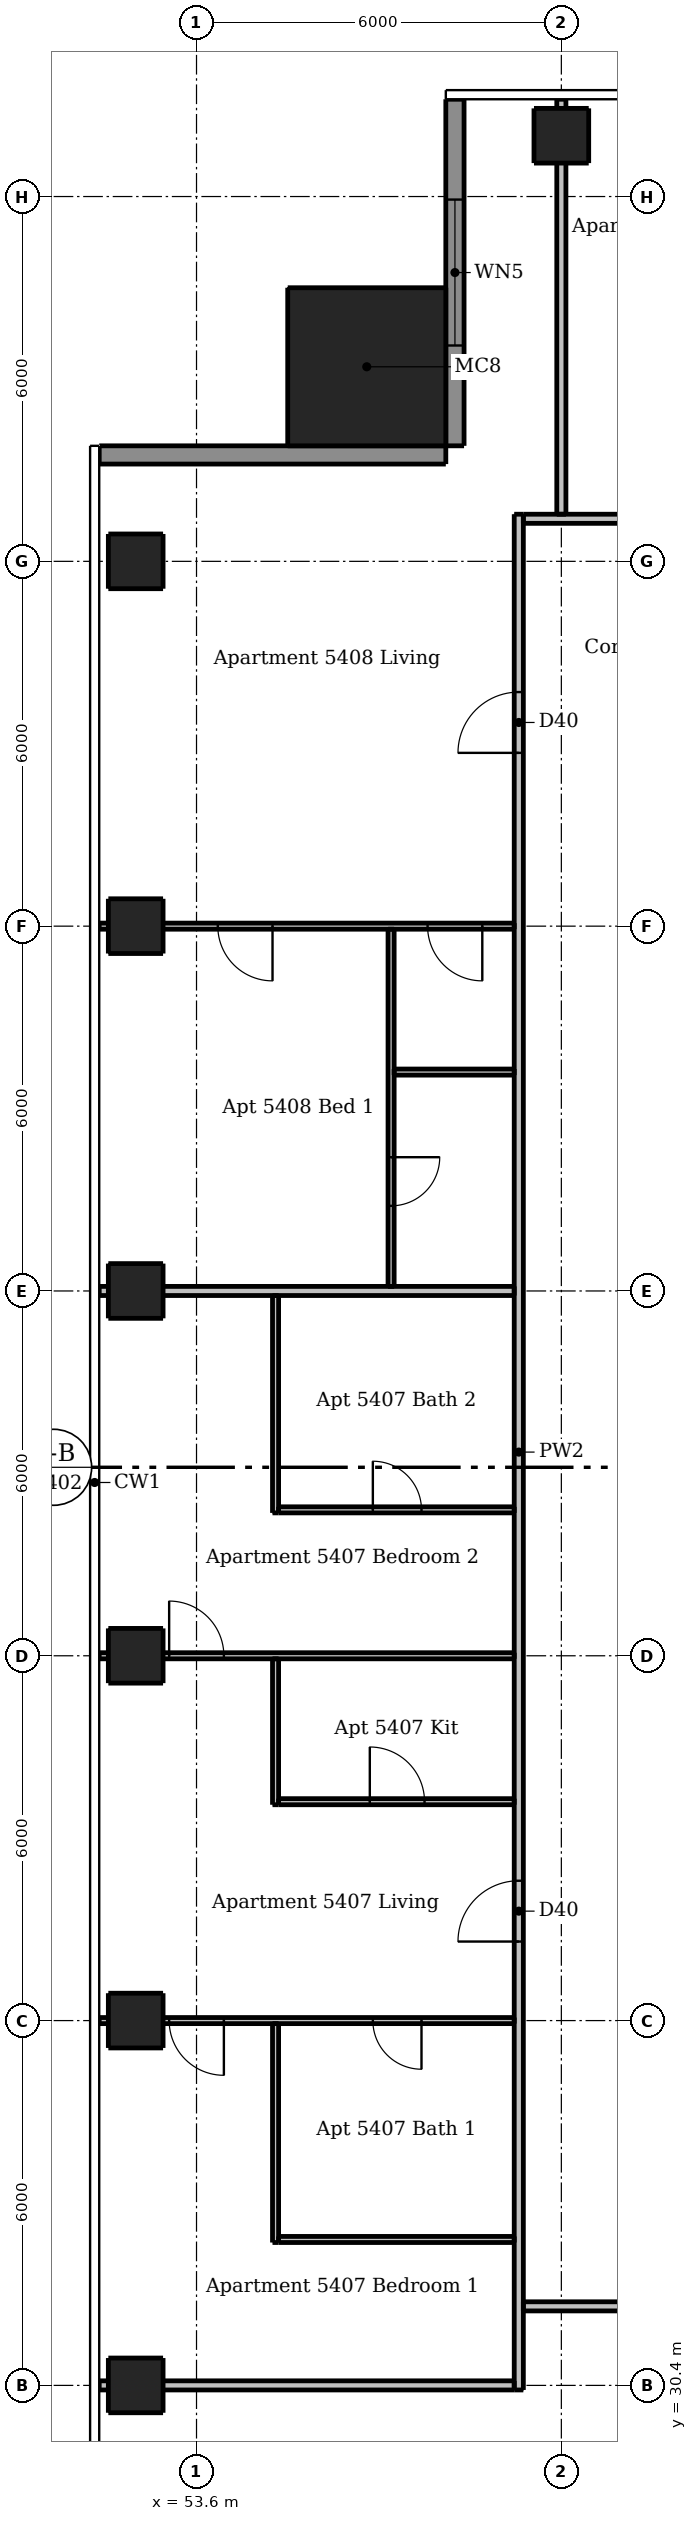
"""IFC4 building model, lengths in metres.
Left out: names, types, materials, properties, quantities, classifications, styles, units other than length and angle.
Written with IfcOpenShell. Run it as: python <this file> out.ifc"""

import sys

from ifc_helpers import new_model, si_unit, direction, frame, frame_2d, origin, origin_2d, place, context, subcontext, project, spatial, rectangle, extrude, element, fill, save


model = new_model("IFC4")
c1 = context("Model", 3, precision=1e-05, world=origin(), true_north=direction((0.0, 1.0)))
c2 = subcontext(c1, "Body", "Model", "MODEL_VIEW")
j1 = project(units=[si_unit("LENGTHUNIT", "METRE"), si_unit("PLANEANGLEUNIT", "RADIAN")], contexts=[c1])
p1 = place(None, origin())
s1 = spatial("IfcSite", under=j1, at=p1, CompositionType="ELEMENT")
p2 = place(p1, origin())
s2 = spatial("IfcBuilding", under=s1, at=p2, CompositionType="ELEMENT")
p3 = place(p2, frame((0.0, 0.0, 203.5)))
s3 = spatial("IfcBuildingStorey", under=s2, at=p3, CompositionType="ELEMENT", Elevation=203.5)
for number, where, z_axis, x_axis in (
    (1, (59.6, 67.4, 0.0), (0.0, 0.0, 1.0), (1.0, 0.0, 0.0)),
    (2, (52.6, 30.4, 0.0), (0.0, 0.0, 1.0), (1.0, 0.0, 0.0)),
    (3, (52.6, 36.4, 0.0), (0.0, 0.0, 1.0), (1.0, 0.0, 0.0)),
    (4, (52.6, 42.4, 0.0), (0.0, 0.0, 1.0), (1.0, 0.0, 0.0)),
    (5, (52.6, 48.4, 0.0), (0.0, 0.0, 1.0), (1.0, 0.0, 0.0)),
    (6, (52.6, 54.4, 0.0), (0.0, 0.0, 1.0), (1.0, 0.0, 0.0)),
    (7, (52.6, 60.4, 0.0), (0.0, 0.0, 1.0), (1.0, 0.0, 0.0)),
):
    element("IfcColumn", number, at=place(p3, frame(where, z_axis=z_axis, x_axis=x_axis)), inside=s3, PredefinedType="COLUMN", context=c2, shape_type="SweptSolid", body=[
        extrude(rectangle(XDim=0.9, YDim=0.9, at=origin_2d()), origin(), (0.0, 0.0, 1.0), 3.05),
    ])
p4 = place(p3, frame((56.4, 63.6, 0.0), z_axis=(0.0, 0.0, 1.0), x_axis=(1.0, 0.0, 0.0)))
e8 = element("IfcColumn", 8, at=p4, inside=s3, PredefinedType="COLUMN", context=c2, shape_type="SweptSolid", body=[
    extrude(rectangle(XDim=2.6, YDim=2.6, at=origin_2d()), origin(), (0.0, 0.0, 1.0), 3.3),
])
p5 = place(p3, frame((57.85, 68.0, 0.0), z_axis=(0.0, 0.0, 1.0), x_axis=(0.0, -1.0, 0.0)))
e9 = element("IfcWall", 9, at=p5, inside=s3, PredefinedType="SOLIDWALL", context=c2, shape_type="SweptSolid", body=[
    extrude(rectangle(XDim=5.7, YDim=0.3, at=frame_2d((2.85, 0.0))), origin(), (0.0, 0.0, 1.0), 3.05),
])
p6 = place(p5, frame((1.65, 0.0, 0.15)))
e10 = element("IfcOpeningElement", 10, at=p6, cuts=e9, PredefinedType="OPENING", context=c2, shape_type="SweptSolid", body=[
    extrude(rectangle(XDim=2.4, YDim=2.1, at=frame_2d((1.2, 1.05))), frame((0.0, 0.16, 0.0), z_axis=(0.0, -1.0, 0.0), x_axis=(1.0, 0.0, 0.0)), (0.0, 0.0, 1.0), 0.32),
])
p7 = place(p3, frame((57.7, 62.15, 0.0), z_axis=(0.0, 0.0, 1.0), x_axis=(-1.0, 0.0, 0.0)))
e11 = element("IfcWall", 11, at=p7, inside=s3, PredefinedType="SOLIDWALL", context=c2, shape_type="SweptSolid", body=[
    extrude(rectangle(XDim=5.7, YDim=0.3, at=frame_2d((2.85, 0.0))), origin(), (0.0, 0.0, 1.0), 3.05),
])
p8 = place(p3, frame((54.9, 32.75, 0.0), z_axis=(0.0, 0.0, 1.0), x_axis=(0.0, 1.0, 0.0)))
e12 = element("IfcWall", 12, at=p8, inside=s3, PredefinedType="PARTITIONING", context=c2, shape_type="SweptSolid", body=[
    extrude(rectangle(XDim=3.6, YDim=0.1, at=frame_2d((1.8, 0.0))), origin(), (0.0, 0.0, 1.0), 3.05),
])
p9 = place(p3, frame((54.9, 39.95, 0.0), z_axis=(0.0, 0.0, 1.0), x_axis=(0.0, 1.0, 0.0)))
e13 = element("IfcWall", 13, at=p9, inside=s3, PredefinedType="PARTITIONING", context=c2, shape_type="SweptSolid", body=[
    extrude(rectangle(XDim=2.4, YDim=0.1, at=frame_2d((1.2, 0.0))), origin(), (0.0, 0.0, 1.0), 3.05),
])
p10 = place(p3, frame((54.9, 44.75, 0.0), z_axis=(0.0, 0.0, 1.0), x_axis=(0.0, 1.0, 0.0)))
e14 = element("IfcWall", 14, at=p10, inside=s3, PredefinedType="PARTITIONING", context=c2, shape_type="SweptSolid", body=[
    extrude(rectangle(XDim=3.575, YDim=0.1, at=frame_2d((1.788, 0.0))), origin(), (0.0, 0.0, 1.0), 3.05),
])
p11 = place(p3, frame((56.8, 54.35, 0.0), z_axis=(0.0, 0.0, 1.0), x_axis=(0.0, -1.0, 0.0)))
e15 = element("IfcWall", 15, at=p11, inside=s3, PredefinedType="PARTITIONING", context=c2, shape_type="SweptSolid", body=[
    extrude(rectangle(XDim=5.875, YDim=0.1, at=frame_2d((2.938, 0.0))), origin(), (0.0, 0.0, 1.0), 3.05),
])
p12 = place(p11, frame((3.75, 0.0, 0.0)))
e16 = element("IfcOpeningElement", 16, at=p12, cuts=e15, PredefinedType="OPENING", context=c2, shape_type="SweptSolid", body=[
    extrude(rectangle(XDim=0.8, YDim=2.1, at=frame_2d((0.4, 1.05))), frame((0.0, 0.06, 0.0), z_axis=(0.0, -1.0, 0.0), x_axis=(1.0, 0.0, 0.0)), (0.0, 0.0, 1.0), 0.12),
])
p13 = place(p3, frame((58.825, 54.4, 0.0), z_axis=(0.0, 0.0, 1.0), x_axis=(-1.0, 0.0, 0.0)))
e17 = element("IfcWall", 17, at=p13, inside=s3, PredefinedType="PARTITIONING", context=c2, shape_type="SweptSolid", body=[
    extrude(rectangle(XDim=6.825, YDim=0.1, at=frame_2d((3.413, 0.0))), origin(), (0.0, 0.0, 1.0), 2.516),
])
p14 = place(p13, frame((0.525, 0.0, 0.0)))
e18 = element("IfcOpeningElement", 18, at=p14, cuts=e17, PredefinedType="OPENING", context=c2, shape_type="SweptSolid", body=[
    extrude(rectangle(XDim=0.9, YDim=2.1, at=frame_2d((0.45, 1.05))), frame((0.0, 0.06, 0.0), z_axis=(0.0, -1.0, 0.0), x_axis=(1.0, 0.0, 0.0)), (0.0, 0.0, 1.0), 0.12),
])
p15 = place(p13, frame((3.975, 0.0, 0.0)))
e19 = element("IfcOpeningElement", 19, at=p15, cuts=e17, PredefinedType="OPENING", context=c2, shape_type="SweptSolid", body=[
    extrude(rectangle(XDim=0.9, YDim=2.1, at=frame_2d((0.45, 1.05))), frame((0.0, 0.06, 0.0), z_axis=(0.0, -1.0, 0.0), x_axis=(1.0, 0.0, 0.0)), (0.0, 0.0, 1.0), 0.12),
])
p16 = place(p3, frame((56.85, 52.0, 0.0), z_axis=(0.0, 0.0, 1.0), x_axis=(1.0, 0.0, 0.0)))
e20 = element("IfcWall", 20, at=p16, inside=s3, PredefinedType="PARTITIONING", context=c2, shape_type="SweptSolid", body=[
    extrude(rectangle(XDim=1.975, YDim=0.1, at=frame_2d((0.987, 0.0))), origin(), (0.0, 0.0, 1.0), 3.05),
])
p17 = place(p3, frame((54.95, 44.8, 0.0), z_axis=(0.0, 0.0, 1.0), x_axis=(1.0, 0.0, 0.0)))
e21 = element("IfcWall", 21, at=p17, inside=s3, PredefinedType="PARTITIONING", context=c2, shape_type="SweptSolid", body=[
    extrude(rectangle(XDim=3.875, YDim=0.1, at=frame_2d((1.938, 0.0))), origin(), (0.0, 0.0, 1.0), 3.05),
])
p18 = place(p17, frame((1.55, 0.0, 0.0)))
e22 = element("IfcOpeningElement", 22, at=p18, cuts=e21, PredefinedType="OPENING", context=c2, shape_type="SweptSolid", body=[
    extrude(rectangle(XDim=0.8, YDim=2.1, at=frame_2d((0.4, 1.05))), frame((0.0, 0.06, 0.0), z_axis=(0.0, -1.0, 0.0), x_axis=(1.0, 0.0, 0.0)), (0.0, 0.0, 1.0), 0.12),
])
p19 = place(p3, frame((52.0, 42.4, 0.0), z_axis=(0.0, 0.0, 1.0), x_axis=(1.0, 0.0, 0.0)))
e23 = element("IfcWall", 23, at=p19, inside=s3, PredefinedType="PARTITIONING", context=c2, shape_type="SweptSolid", body=[
    extrude(rectangle(XDim=6.825, YDim=0.1, at=frame_2d((3.413, 0.0))), origin(), (0.0, 0.0, 1.0), 2.516),
])
p20 = place(p19, frame((1.15, 0.0, 0.0)))
e24 = element("IfcOpeningElement", 24, at=p20, cuts=e23, PredefinedType="OPENING", context=c2, shape_type="SweptSolid", body=[
    extrude(rectangle(XDim=0.9, YDim=2.1, at=frame_2d((0.45, 1.05))), frame((0.0, 0.06, 0.0), z_axis=(0.0, -1.0, 0.0), x_axis=(1.0, 0.0, 0.0)), (0.0, 0.0, 1.0), 0.12),
])
p21 = place(p3, frame((54.95, 40.0, 0.0), z_axis=(0.0, 0.0, 1.0), x_axis=(1.0, 0.0, 0.0)))
e25 = element("IfcWall", 25, at=p21, inside=s3, PredefinedType="PARTITIONING", context=c2, shape_type="SweptSolid", body=[
    extrude(rectangle(XDim=3.875, YDim=0.1, at=frame_2d((1.938, 0.0))), origin(), (0.0, 0.0, 1.0), 3.05),
])
p22 = place(p21, frame((1.5, 0.0, 0.0)))
e26 = element("IfcOpeningElement", 26, at=p22, cuts=e25, PredefinedType="OPENING", context=c2, shape_type="SweptSolid", body=[
    extrude(rectangle(XDim=0.9, YDim=2.1, at=frame_2d((0.45, 1.05))), frame((0.0, 0.06, 0.0), z_axis=(0.0, -1.0, 0.0), x_axis=(1.0, 0.0, 0.0)), (0.0, 0.0, 1.0), 0.12),
])
p23 = place(p3, frame((58.825, 36.4, 0.0), z_axis=(0.0, 0.0, 1.0), x_axis=(-1.0, 0.0, 0.0)))
e27 = element("IfcWall", 27, at=p23, inside=s3, PredefinedType="PARTITIONING", context=c2, shape_type="SweptSolid", body=[
    extrude(rectangle(XDim=6.825, YDim=0.1, at=frame_2d((3.413, 0.0))), origin(), (0.0, 0.0, 1.0), 2.516),
])
p24 = place(p23, frame((4.775, 0.0, 0.0)))
e28 = element("IfcOpeningElement", 28, at=p24, cuts=e27, PredefinedType="OPENING", context=c2, shape_type="SweptSolid", body=[
    extrude(rectangle(XDim=0.9, YDim=2.1, at=frame_2d((0.45, 1.05))), frame((0.0, 0.06, 0.0), z_axis=(0.0, -1.0, 0.0), x_axis=(1.0, 0.0, 0.0)), (0.0, 0.0, 1.0), 0.12),
])
p25 = place(p23, frame((1.525, 0.0, 0.0)))
e29 = element("IfcOpeningElement", 29, at=p25, cuts=e27, PredefinedType="OPENING", context=c2, shape_type="SweptSolid", body=[
    extrude(rectangle(XDim=0.8, YDim=2.1, at=frame_2d((0.4, 1.05))), frame((0.0, 0.06, 0.0), z_axis=(0.0, -1.0, 0.0), x_axis=(1.0, 0.0, 0.0)), (0.0, 0.0, 1.0), 0.12),
])
p26 = place(p3, frame((54.95, 32.8, 0.0), z_axis=(0.0, 0.0, 1.0), x_axis=(1.0, 0.0, 0.0)))
e30 = element("IfcWall", 30, at=p26, inside=s3, PredefinedType="PARTITIONING", context=c2, shape_type="SweptSolid", body=[
    extrude(rectangle(XDim=3.875, YDim=0.1, at=frame_2d((1.938, 0.0))), origin(), (0.0, 0.0, 1.0), 3.05),
])
p27 = place(p3, frame((58.9, 30.325, 0.0), z_axis=(0.0, 0.0, 1.0), x_axis=(0.0, 1.0, 0.0)))
e31 = element("IfcWall", 31, at=p27, inside=s3, PredefinedType="PARTITIONING", context=c2, shape_type="SweptSolid", body=[
    extrude(rectangle(XDim=30.85, YDim=0.15, at=frame_2d((15.425, 0.0))), origin(), (0.0, 0.0, 1.0), 3.05),
])
p28 = place(p27, frame((7.375, 0.0, 0.0)))
e32 = element("IfcOpeningElement", 32, at=p28, cuts=e31, PredefinedType="OPENING", context=c2, shape_type="SweptSolid", body=[
    extrude(rectangle(XDim=1.0, YDim=2.1, at=frame_2d((0.5, 1.05))), frame((0.0, 0.085, 0.0), z_axis=(0.0, -1.0, 0.0), x_axis=(1.0, 0.0, 0.0)), (0.0, 0.0, 1.0), 0.17),
])
p29 = place(p27, frame((26.925, 0.0, 0.0)))
e33 = element("IfcOpeningElement", 33, at=p29, cuts=e31, PredefinedType="OPENING", context=c2, shape_type="SweptSolid", body=[
    extrude(rectangle(XDim=1.0, YDim=2.1, at=frame_2d((0.5, 1.05))), frame((0.0, 0.085, 0.0), z_axis=(0.0, -1.0, 0.0), x_axis=(1.0, 0.0, 0.0)), (0.0, 0.0, 1.0), 0.17),
])
p30 = place(p3, frame((59.6, 61.175, 0.0), z_axis=(0.0, 0.0, 1.0), x_axis=(0.0, 1.0, 0.0)))
e34 = element("IfcWall", 34, at=p30, inside=s3, PredefinedType="PARTITIONING", context=c2, shape_type="SweptSolid", body=[
    extrude(rectangle(XDim=6.825, YDim=0.15, at=frame_2d((3.413, 0.0))), origin(), (0.0, 0.0, 1.0), 2.51),
])
p31 = place(p3, frame((58.975, 61.1, 0.0), z_axis=(0.0, 0.0, 1.0), x_axis=(1.0, 0.0, 0.0)))
e35 = element("IfcWall", 35, at=p31, inside=s3, PredefinedType="PARTITIONING", context=c2, shape_type="SweptSolid", body=[
    extrude(rectangle(XDim=29.25, YDim=0.15, at=frame_2d((14.625, 0.0))), origin(), (0.0, 0.0, 1.0), 3.05),
])
p32 = place(p31, frame((7.925, 0.0, 0.0)))
e36 = element("IfcOpeningElement", 36, at=p32, cuts=e35, PredefinedType="OPENING", context=c2, shape_type="SweptSolid", body=[
    extrude(rectangle(XDim=1.0, YDim=2.1, at=frame_2d((0.5, 1.05))), frame((0.0, 0.085, 0.0), z_axis=(0.0, -1.0, 0.0), x_axis=(1.0, 0.0, 0.0)), (0.0, 0.0, 1.0), 0.17),
])
p33 = place(p31, frame((26.475, 0.0, 0.0)))
e37 = element("IfcOpeningElement", 37, at=p33, cuts=e35, PredefinedType="OPENING", context=c2, shape_type="SweptSolid", body=[
    extrude(rectangle(XDim=1.0, YDim=2.1, at=frame_2d((0.5, 1.05))), frame((0.0, 0.085, 0.0), z_axis=(0.0, -1.0, 0.0), x_axis=(1.0, 0.0, 0.0)), (0.0, 0.0, 1.0), 0.17),
])
p34 = place(p3, frame((52.0, 48.4, 0.0), z_axis=(0.0, 0.0, 1.0), x_axis=(1.0, 0.0, 0.0)))
e38 = element("IfcWall", 38, at=p34, inside=s3, PredefinedType="PARTITIONING", context=c2, shape_type="SweptSolid", body=[
    extrude(rectangle(XDim=6.825, YDim=0.15, at=frame_2d((3.413, 0.0))), origin(), (0.0, 0.0, 1.0), 2.516),
])
p35 = place(p3, frame((89.525, 31.7, 0.0), z_axis=(0.0, 0.0, 1.0), x_axis=(-1.0, 0.0, 0.0)))
e39 = element("IfcWall", 39, at=p35, inside=s3, PredefinedType="PARTITIONING", context=c2, shape_type="SweptSolid", body=[
    extrude(rectangle(XDim=30.55, YDim=0.15, at=frame_2d((15.275, 0.0))), origin(), (0.0, 0.0, 1.0), 3.05),
])
p36 = place(p35, frame((26.775, 0.0, 0.0)))
e40 = element("IfcOpeningElement", 40, at=p36, cuts=e39, PredefinedType="OPENING", context=c2, shape_type="SweptSolid", body=[
    extrude(rectangle(XDim=1.0, YDim=2.1, at=frame_2d((0.5, 1.05))), frame((0.0, 0.085, 0.0), z_axis=(0.0, -1.0, 0.0), x_axis=(1.0, 0.0, 0.0)), (0.0, 0.0, 1.0), 0.17),
])
p37 = place(p35, frame((9.075, 0.0, 0.0)))
e41 = element("IfcOpeningElement", 41, at=p37, cuts=e39, PredefinedType="OPENING", context=c2, shape_type="SweptSolid", body=[
    extrude(rectangle(XDim=1.0, YDim=2.1, at=frame_2d((0.5, 1.05))), frame((0.0, 0.085, 0.0), z_axis=(0.0, -1.0, 0.0), x_axis=(1.0, 0.0, 0.0)), (0.0, 0.0, 1.0), 0.17),
])
p38 = place(p3, frame((52.0, 30.4, 0.0), z_axis=(0.0, 0.0, 1.0), x_axis=(1.0, 0.0, 0.0)))
e42 = element("IfcWall", 42, at=p38, inside=s3, PredefinedType="PARTITIONING", context=c2, shape_type="SweptSolid", body=[
    extrude(rectangle(XDim=6.825, YDim=0.15, at=frame_2d((3.413, 0.0))), origin(), (0.0, 0.0, 1.0), 2.647),
])
p39 = place(p6, origin())
e43 = element("IfcWindow", 43, at=p39, inside=s3, PartitioningType="DOUBLE_PANEL_VERTICAL", PredefinedType="WINDOW", context=c2, shape_type="SweptSolid", body=[
    extrude(rectangle(XDim=2.4, YDim=2.1, at=frame_2d((1.2, 1.05))), frame((0.0, 0.03, 0.0), z_axis=(0.0, -1.0, 0.0), x_axis=(1.0, 0.0, 0.0)), (0.0, 0.0, 1.0), 0.06),
])
fill(e10, e43)
p40 = place(p28, origin())
e44 = element("IfcDoor", 44, at=p40, inside=s3, OperationType="SINGLE_SWING_LEFT", PredefinedType="DOOR", context=c2, shape_type="SweptSolid", body=[
    extrude(rectangle(XDim=1.0, YDim=2.1, at=frame_2d((0.5, 1.05))), frame((0.0, 0.025, 0.0), z_axis=(0.0, -1.0, 0.0), x_axis=(1.0, 0.0, 0.0)), (0.0, 0.0, 1.0), 0.05),
])
fill(e32, e44)
p41 = place(p22, origin())
e45 = element("IfcDoor", 45, at=p41, inside=s3, OperationType="SINGLE_SWING_LEFT", PredefinedType="DOOR", context=c2, shape_type="SweptSolid", body=[
    extrude(rectangle(XDim=0.9, YDim=2.1, at=frame_2d((0.45, 1.05))), frame((0.0, 0.025, 0.0), z_axis=(0.0, -1.0, 0.0), x_axis=(1.0, 0.0, 0.0)), (0.0, 0.0, 1.0), 0.05),
])
fill(e26, e45)
p42 = place(p24, origin())
e46 = element("IfcDoor", 46, at=p42, inside=s3, OperationType="SINGLE_SWING_LEFT", PredefinedType="DOOR", context=c2, shape_type="SweptSolid", body=[
    extrude(rectangle(XDim=0.9, YDim=2.1, at=frame_2d((0.45, 1.05))), frame((0.0, 0.025, 0.0), z_axis=(0.0, -1.0, 0.0), x_axis=(1.0, 0.0, 0.0)), (0.0, 0.0, 1.0), 0.05),
])
fill(e28, e46)
p43 = place(p25, origin())
e47 = element("IfcDoor", 47, at=p43, inside=s3, OperationType="SINGLE_SWING_LEFT", PredefinedType="DOOR", context=c2, shape_type="SweptSolid", body=[
    extrude(rectangle(XDim=0.8, YDim=2.1, at=frame_2d((0.4, 1.05))), frame((0.0, 0.025, 0.0), z_axis=(0.0, -1.0, 0.0), x_axis=(1.0, 0.0, 0.0)), (0.0, 0.0, 1.0), 0.05),
])
fill(e29, e47)
p44 = place(p20, origin())
e48 = element("IfcDoor", 48, at=p44, inside=s3, OperationType="SINGLE_SWING_LEFT", PredefinedType="DOOR", context=c2, shape_type="SweptSolid", body=[
    extrude(rectangle(XDim=0.9, YDim=2.1, at=frame_2d((0.45, 1.05))), frame((0.0, 0.025, 0.0), z_axis=(0.0, -1.0, 0.0), x_axis=(1.0, 0.0, 0.0)), (0.0, 0.0, 1.0), 0.05),
])
fill(e24, e48)
p45 = place(p18, origin())
e49 = element("IfcDoor", 49, at=p45, inside=s3, OperationType="SINGLE_SWING_LEFT", PredefinedType="DOOR", context=c2, shape_type="SweptSolid", body=[
    extrude(rectangle(XDim=0.8, YDim=2.1, at=frame_2d((0.4, 1.05))), frame((0.0, 0.025, 0.0), z_axis=(0.0, -1.0, 0.0), x_axis=(1.0, 0.0, 0.0)), (0.0, 0.0, 1.0), 0.05),
])
fill(e22, e49)
p46 = place(p29, origin())
e50 = element("IfcDoor", 50, at=p46, inside=s3, OperationType="SINGLE_SWING_LEFT", PredefinedType="DOOR", context=c2, shape_type="SweptSolid", body=[
    extrude(rectangle(XDim=1.0, YDim=2.1, at=frame_2d((0.5, 1.05))), frame((0.0, 0.025, 0.0), z_axis=(0.0, -1.0, 0.0), x_axis=(1.0, 0.0, 0.0)), (0.0, 0.0, 1.0), 0.05),
])
fill(e33, e50)
p47 = place(p14, origin())
e51 = element("IfcDoor", 51, at=p47, inside=s3, OperationType="SINGLE_SWING_LEFT", PredefinedType="DOOR", context=c2, shape_type="SweptSolid", body=[
    extrude(rectangle(XDim=0.9, YDim=2.1, at=frame_2d((0.45, 1.05))), frame((0.0, 0.025, 0.0), z_axis=(0.0, -1.0, 0.0), x_axis=(1.0, 0.0, 0.0)), (0.0, 0.0, 1.0), 0.05),
])
fill(e18, e51)
p48 = place(p15, origin())
e52 = element("IfcDoor", 52, at=p48, inside=s3, OperationType="SINGLE_SWING_LEFT", PredefinedType="DOOR", context=c2, shape_type="SweptSolid", body=[
    extrude(rectangle(XDim=0.9, YDim=2.1, at=frame_2d((0.45, 1.05))), frame((0.0, 0.025, 0.0), z_axis=(0.0, -1.0, 0.0), x_axis=(1.0, 0.0, 0.0)), (0.0, 0.0, 1.0), 0.05),
])
fill(e19, e52)
p49 = place(p12, origin())
e53 = element("IfcDoor", 53, at=p49, inside=s3, OperationType="SINGLE_SWING_LEFT", PredefinedType="DOOR", context=c2, shape_type="SweptSolid", body=[
    extrude(rectangle(XDim=0.8, YDim=2.1, at=frame_2d((0.4, 1.05))), frame((0.0, 0.025, 0.0), z_axis=(0.0, -1.0, 0.0), x_axis=(1.0, 0.0, 0.0)), (0.0, 0.0, 1.0), 0.05),
])
fill(e16, e53)
save(model, sys.argv[1])
